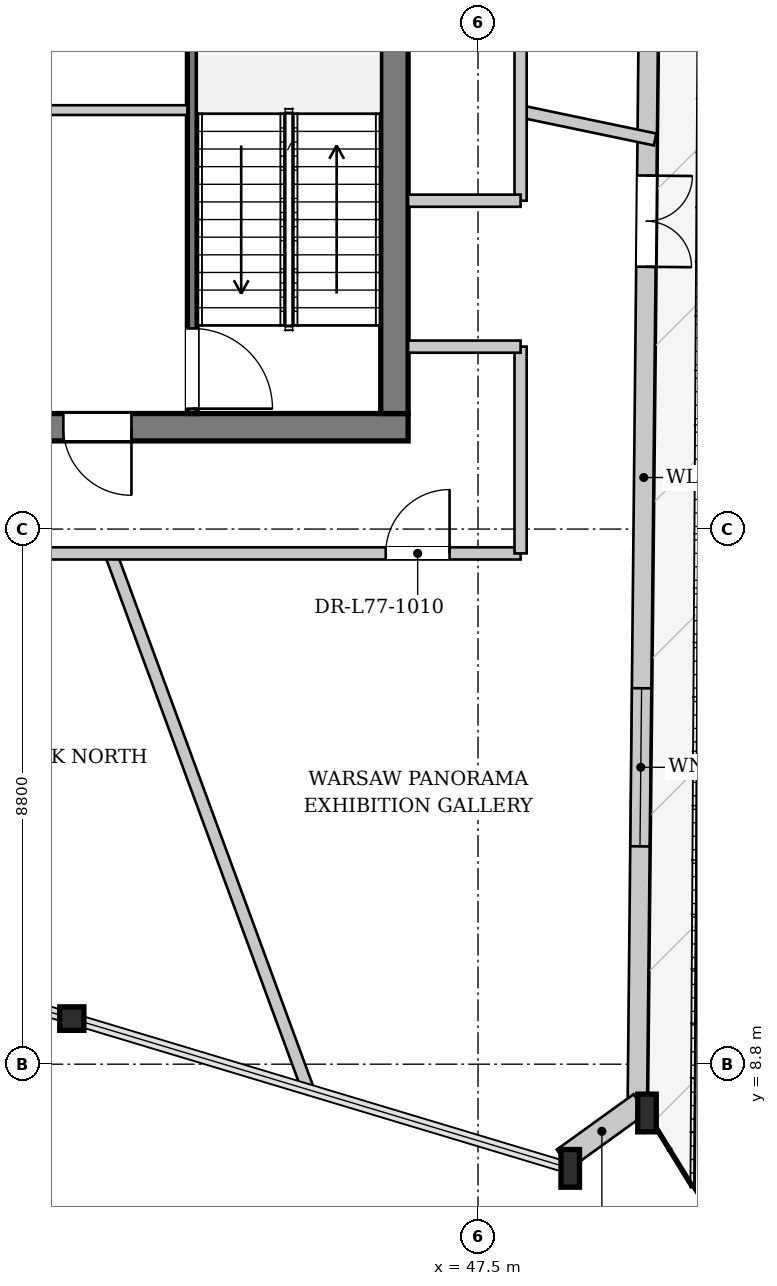
"""IFC4 building model, lengths in metres.
Left out: names, types, materials, properties, quantities, classifications, styles, units other than length and angle.
Written with IfcOpenShell. Run it as: python <this file> out.ifc"""

import sys

from ifc_helpers import new_model, si_unit, direction, frame, frame_2d, origin, origin_2d, place, context, subcontext, project, spatial, rectangle, i_section, extrude, source, transform, mapped, element, fill, save


model = new_model("IFC4")
c1 = context("Model", 3, precision=1e-05, world=origin(), true_north=direction((0.0, 1.0)))
c2 = subcontext(c1, "Body", "Model", "MODEL_VIEW")
j1 = project(units=[si_unit("LENGTHUNIT", "METRE"), si_unit("PLANEANGLEUNIT", "RADIAN")], contexts=[c1])
p1 = place(None, origin())
s1 = spatial("IfcSite", under=j1, at=p1, CompositionType="ELEMENT")
p2 = place(p1, origin())
s2 = spatial("IfcBuilding", under=s1, at=p2, CompositionType="ELEMENT")
p3 = place(p2, frame((0.0, 0.0, 290.5)))
s3 = spatial("IfcBuildingStorey", under=s2, at=p3, CompositionType="ELEMENT", Elevation=290.5)
m1 = source(origin(), c2, "Body", "SweptSolid", [
    extrude(i_section(OverallWidth=0.398, OverallDepth=0.387, WebThickness=0.019, FlangeThickness=0.029, at=origin_2d()), origin(), (0.0, 0.0, 1.0), 4.255),
])
p4 = place(p3, frame((40.819, 9.55, 0.0), z_axis=(0.0, 0.0, 1.0), x_axis=(1.0, 0.0, 0.0)))
e1 = element("IfcColumn", 1, at=p4, inside=s3, PredefinedType="COLUMN", context=c2, shape_type="MappedRepresentation", body=[
    mapped(m1, transform((0.0, 0.0, 0.0), x_axis=(1.0, 0.0, 0.0), y_axis=(0.0, 1.0, 0.0), z_axis=(0.0, 0.0, 1.0), scale=1.0)),
])
m2 = source(origin(), c2, "Body", "SweptSolid", [
    extrude(i_section(OverallWidth=0.305, OverallDepth=0.62, WebThickness=0.021, FlangeThickness=0.04, at=origin_2d()), origin(), (0.0, 0.0, 1.0), 4.255),
])
for number, where, z_axis, x_axis in (
    (2, (49.017, 7.087, 0.0), (0.0, 0.0, 1.0), (1.0, 0.0, 0.0)),
    (3, (50.279, 7.997, 0.0), (0.0, 0.0, 1.0), (1.0, 0.0, 0.0)),
):
    element("IfcColumn", number, at=place(p3, frame(where, z_axis=z_axis, x_axis=x_axis)), inside=s3, PredefinedType="COLUMN", context=c2, shape_type="MappedRepresentation", body=[
        mapped(m2, transform((0.0, 0.0, 0.0), x_axis=(1.0, 0.0, 0.0), y_axis=(0.0, 1.0, 0.0), z_axis=(0.0, 0.0, 1.0), scale=1.0)),
    ])
p5 = place(p3, frame((50.342, 29.858, 0.0), z_axis=(0.0, 0.0, 1.0), x_axis=(-0.010207538584, -0.999947901721, 0.0)))
e4 = element("IfcWall", 4, at=p5, inside=s3, PredefinedType="SOLIDWALL", context=c2, shape_type="SweptSolid", body=[
    extrude(rectangle(XDim=21.861, YDim=0.32, at=frame_2d((10.93, 0.0))), origin(), (0.0, 0.0, 1.0), 3.782),
])
p6 = place(p5, frame((6.445, 0.0, 0.0)))
e5 = element("IfcOpeningElement", 5, at=p6, cuts=e4, PredefinedType="OPENING", context=c2, shape_type="SweptSolid", body=[
    extrude(rectangle(XDim=1.5, YDim=2.3, at=frame_2d((0.75, 1.15))), frame((0.0, 0.17, 0.0), z_axis=(0.0, -1.0, 0.0), x_axis=(1.0, 0.0, 0.0)), (0.0, 0.0, 1.0), 0.34),
])
p7 = place(p5, frame((14.877, 0.0, 0.65)))
e6 = element("IfcOpeningElement", 6, at=p7, cuts=e4, PredefinedType="OPENING", context=c2, shape_type="SweptSolid", body=[
    extrude(rectangle(XDim=2.6, YDim=2.35, at=frame_2d((1.3, 1.175))), frame((0.0, 0.17, 0.0), z_axis=(0.0, -1.0, 0.0), x_axis=(1.0, 0.0, 0.0)), (0.0, 0.0, 1.0), 0.34),
])
p8 = place(p3, frame((50.168, 8.151, 0.0), z_axis=(0.0, 0.0, 1.0), x_axis=(-0.811063846967, -0.584957636195, 0.0)))
e7 = element("IfcWall", 7, at=p8, inside=s3, PredefinedType="SOLIDWALL", context=c2, shape_type="SweptSolid", body=[
    extrude(rectangle(XDim=1.556, YDim=0.38, at=frame_2d((0.778, 0.0))), origin(), (0.0, 0.0, 1.0), 3.782),
])
p9 = place(p3, frame((46.35, 19.275, 0.0), z_axis=(0.0, 0.0, 1.0), x_axis=(-1.0, 0.0, 0.0)))
e8 = element("IfcWall", 8, at=p9, inside=s3, PredefinedType="SHEAR", context=c2, shape_type="SweptSolid", body=[
    extrude(rectangle(XDim=16.7, YDim=0.45, at=frame_2d((8.35, 0.0))), origin(), (0.0, 0.0, 1.0), 4.24),
])
p10 = place(p9, frame((4.55, 0.0, 0.0)))
e9 = element("IfcOpeningElement", 9, at=p10, cuts=e8, PredefinedType="OPENING", context=c2, shape_type="SweptSolid", body=[
    extrude(rectangle(XDim=1.12, YDim=2.25, at=frame_2d((0.56, 1.125))), frame((0.0, 0.235, 0.0), z_axis=(0.0, -1.0, 0.0), x_axis=(1.0, 0.0, 0.0)), (0.0, 0.0, 1.0), 0.47),
])
p11 = place(p9, frame((11.05, 0.0, 0.0)))
e10 = element("IfcOpeningElement", 10, at=p11, cuts=e8, PredefinedType="OPENING", context=c2, shape_type="SweptSolid", body=[
    extrude(rectangle(XDim=1.12, YDim=2.25, at=frame_2d((0.56, 1.125))), frame((0.0, 0.235, 0.0), z_axis=(0.0, -1.0, 0.0), x_axis=(1.0, 0.0, 0.0)), (0.0, 0.0, 1.0), 0.47),
])
p12 = place(p3, frame((46.125, 33.7, 0.0), z_axis=(0.0, 0.0, 1.0), x_axis=(0.0, -1.0, 0.0)))
e11 = element("IfcWall", 11, at=p12, inside=s3, PredefinedType="SHEAR", context=c2, shape_type="SweptSolid", body=[
    extrude(rectangle(XDim=14.2, YDim=0.45, at=frame_2d((7.1, 0.0))), origin(), (0.0, 0.0, 1.0), 4.24),
])
p13 = place(p12, frame((5.18, 0.0, 0.0)))
e12 = element("IfcOpeningElement", 12, at=p13, cuts=e11, PredefinedType="OPENING", context=c2, shape_type="SweptSolid", body=[
    extrude(rectangle(XDim=1.6, YDim=2.2, at=frame_2d((0.8, 1.1))), frame((0.0, 0.235, 0.0), z_axis=(0.0, -1.0, 0.0), x_axis=(1.0, 0.0, 0.0)), (0.0, 0.0, 1.0), 0.47),
])
p14 = place(p12, frame((2.05, 0.0, 0.0)))
e13 = element("IfcOpeningElement", 13, at=p14, cuts=e11, PredefinedType="OPENING", context=c2, shape_type="SweptSolid", body=[
    extrude(rectangle(XDim=0.95, YDim=2.1, at=frame_2d((0.475, 1.05))), frame((0.0, 0.235, 0.0), z_axis=(0.0, -1.0, 0.0), x_axis=(1.0, 0.0, 0.0)), (0.0, 0.0, 1.0), 0.47),
])
p15 = place(p3, frame((42.8, 26.96, 0.0), z_axis=(0.0, 0.0, 1.0), x_axis=(0.0, -1.0, 0.0)))
e14 = element("IfcWall", 14, at=p15, inside=s3, PredefinedType="PARTITIONING", context=c2, shape_type="SweptSolid", body=[
    extrude(rectangle(XDim=7.46, YDim=0.16, at=frame_2d((3.73, 0.0))), origin(), (0.0, 0.0, 1.0), 4.24),
])
p16 = place(p15, frame((6.06, 0.0, 0.0)))
e15 = element("IfcOpeningElement", 15, at=p16, cuts=e14, PredefinedType="OPENING", context=c2, shape_type="SweptSolid", body=[
    extrude(rectangle(XDim=1.32, YDim=2.2, at=frame_2d((0.66, 1.1))), frame((0.0, 0.09, 0.0), z_axis=(0.0, -1.0, 0.0), x_axis=(1.0, 0.0, 0.0)), (0.0, 0.0, 1.0), 0.18),
])
p17 = place(p3, frame((33.28, 24.49, 0.0), z_axis=(0.0, 0.0, 1.0), x_axis=(1.0, 0.0, 0.0)))
e16 = element("IfcWall", 16, at=p17, inside=s3, PredefinedType="PARTITIONING", context=c2, shape_type="SweptSolid", body=[
    extrude(rectangle(XDim=9.44, YDim=0.16, at=frame_2d((4.72, 0.0))), origin(), (0.0, 0.0, 1.0), 4.24),
])
p18 = place(p17, frame((0.85, 0.0, 0.95)))
e17 = element("IfcOpeningElement", 17, at=p18, cuts=e16, PredefinedType="OPENING", context=c2, shape_type="SweptSolid", body=[
    extrude(rectangle(XDim=1.4, YDim=1.8, at=frame_2d((0.7, 0.9))), frame((0.0, 0.09, 0.0), z_axis=(0.0, -1.0, 0.0), x_axis=(1.0, 0.0, 0.0)), (0.0, 0.0, 1.0), 0.18),
])
p19 = place(p3, frame((41.458, 17.2, 0.0), z_axis=(0.0, 0.0, 1.0), x_axis=(0.345312374887, -0.938487806927, 0.0)))
e18 = element("IfcWall", 18, at=p19, inside=s3, PredefinedType="PARTITIONING", context=c2, shape_type="SweptSolid", body=[
    extrude(rectangle(XDim=9.357, YDim=0.2, at=frame_2d((4.679, 0.0))), origin(), (0.0, 0.0, 1.0), 4.24),
])
p20 = place(p3, frame((48.2, 24.469, 0.0), z_axis=(0.0, 0.0, 1.0), x_axis=(0.978870641426, -0.204480481596, 0.0)))
e19 = element("IfcWall", 19, at=p20, inside=s3, PredefinedType="PARTITIONING", context=c2, shape_type="SweptSolid", body=[
    extrude(rectangle(XDim=2.26, YDim=0.2, at=frame_2d((1.13, 0.0))), origin(), (0.0, 0.0, 1.0), 4.24),
])
p21 = place(p3, frame((27.8, 17.2, 0.0), z_axis=(0.0, 0.0, 1.0), x_axis=(1.0, 0.0, 0.0)))
e20 = element("IfcWall", 20, at=p21, inside=s3, PredefinedType="PARTITIONING", context=c2, shape_type="SweptSolid", body=[
    extrude(rectangle(XDim=20.4, YDim=0.2, at=frame_2d((10.2, 0.0))), origin(), (0.0, 0.0, 1.0), 3.865),
])
p22 = place(p21, frame((7.835, 0.0, 0.0)))
e21 = element("IfcOpeningElement", 21, at=p22, cuts=e20, PredefinedType="OPENING", context=c2, shape_type="SweptSolid", body=[
    extrude(rectangle(XDim=1.05, YDim=2.2, at=frame_2d((0.525, 1.1))), frame((0.0, 0.11, 0.0), z_axis=(0.0, -1.0, 0.0), x_axis=(1.0, 0.0, 0.0)), (0.0, 0.0, 1.0), 0.22),
])
p23 = place(p21, frame((18.182, 0.0, 0.0)))
e22 = element("IfcOpeningElement", 22, at=p23, cuts=e20, PredefinedType="OPENING", context=c2, shape_type="SweptSolid", body=[
    extrude(rectangle(XDim=1.05, YDim=2.2, at=frame_2d((0.525, 1.1))), frame((0.0, 0.11, 0.0), z_axis=(0.0, -1.0, 0.0), x_axis=(1.0, 0.0, 0.0)), (0.0, 0.0, 1.0), 0.22),
])
p24 = place(p3, frame((48.2, 17.2, 0.0), z_axis=(0.0, 0.0, 1.0), x_axis=(0.0, 1.0, 0.0)))
e23 = element("IfcWall", 23, at=p24, inside=s3, PredefinedType="PARTITIONING", context=c2, shape_type="SweptSolid", body=[
    extrude(rectangle(XDim=3.4, YDim=0.2, at=frame_2d((1.7, 0.0))), origin(), (0.0, 0.0, 1.0), 4.24),
])
p25 = place(p3, frame((46.35, 20.6, 0.0), z_axis=(0.0, 0.0, 1.0), x_axis=(1.0, 0.0, 0.0)))
e24 = element("IfcWall", 24, at=p25, inside=s3, PredefinedType="PARTITIONING", context=c2, shape_type="SweptSolid", body=[
    extrude(rectangle(XDim=1.85, YDim=0.2, at=frame_2d((0.925, 0.0))), origin(), (0.0, 0.0, 1.0), 4.24),
])
p26 = place(p3, frame((48.2, 23.0, 0.0), z_axis=(0.0, 0.0, 1.0), x_axis=(0.0, 1.0, 0.0)))
e25 = element("IfcWall", 25, at=p26, inside=s3, PredefinedType="PARTITIONING", context=c2, shape_type="SweptSolid", body=[
    extrude(rectangle(XDim=13.0, YDim=0.2, at=frame_2d((6.5, 0.0))), origin(), (0.0, 0.0, 1.0), 3.925),
])
p27 = place(p26, frame((9.393, 0.0, 0.0)))
e26 = element("IfcOpeningElement", 26, at=p27, cuts=e25, PredefinedType="OPENING", context=c2, shape_type="SweptSolid", body=[
    extrude(rectangle(XDim=1.05, YDim=2.2, at=frame_2d((0.525, 1.1))), frame((0.0, 0.11, 0.0), z_axis=(0.0, -1.0, 0.0), x_axis=(1.0, 0.0, 0.0)), (0.0, 0.0, 1.0), 0.22),
])
p28 = place(p3, frame((46.35, 23.0, 0.0), z_axis=(0.0, 0.0, 1.0), x_axis=(1.0, 0.0, 0.0)))
e27 = element("IfcWall", 27, at=p28, inside=s3, PredefinedType="PARTITIONING", context=c2, shape_type="SweptSolid", body=[
    extrude(rectangle(XDim=1.85, YDim=0.2, at=frame_2d((0.925, 0.0))), origin(), (0.0, 0.0, 1.0), 4.24),
])
m3 = source(origin(), c2, "Body", "SweptSolid", [
    extrude(rectangle(XDim=1.5, YDim=2.3, at=frame_2d((0.75, 1.15))), frame((0.0, 0.025, 0.0), z_axis=(0.0, -1.0, 0.0), x_axis=(1.0, 0.0, 0.0)), (0.0, 0.0, 1.0), 0.05),
])
p29 = place(p6, origin())
e28 = element("IfcDoor", 28, at=p29, inside=s3, OperationType="DOUBLE_DOOR_SINGLE_SWING", PredefinedType="DOOR", context=c2, shape_type="MappedRepresentation", body=[
    mapped(m3, transform((0.0, 0.0, 0.0), x_axis=(1.0, 0.0, 0.0), y_axis=(0.0, 1.0, 0.0), z_axis=(0.0, 0.0, 1.0), scale=1.0)),
])
fill(e5, e28)
m4 = source(origin(), c2, "Body", "SweptSolid", [
    extrude(rectangle(XDim=2.6, YDim=2.35, at=frame_2d((1.3, 1.175))), frame((0.0, 0.03, 0.0), z_axis=(0.0, -1.0, 0.0), x_axis=(1.0, 0.0, 0.0)), (0.0, 0.0, 1.0), 0.06),
])
p30 = place(p7, origin())
e29 = element("IfcWindow", 29, at=p30, inside=s3, PartitioningType="SINGLE_PANEL", PredefinedType="WINDOW", context=c2, shape_type="MappedRepresentation", body=[
    mapped(m4, transform((0.0, 0.0, 0.0), x_axis=(1.0, 0.0, 0.0), y_axis=(0.0, 1.0, 0.0), z_axis=(0.0, 0.0, 1.0), scale=1.0)),
])
fill(e6, e29)
m5 = source(origin(), c2, "Body", "SweptSolid", [
    extrude(rectangle(XDim=1.12, YDim=2.25, at=frame_2d((0.56, 1.125))), frame((0.0, 0.025, 0.0), z_axis=(0.0, -1.0, 0.0), x_axis=(1.0, 0.0, 0.0)), (0.0, 0.0, 1.0), 0.05),
])
p31 = place(p10, origin())
e30 = element("IfcDoor", 30, at=p31, inside=s3, OperationType="SINGLE_SWING_LEFT", PredefinedType="DOOR", context=c2, shape_type="MappedRepresentation", body=[
    mapped(m5, transform((0.0, 0.0, 0.0), x_axis=(1.0, 0.0, 0.0), y_axis=(0.0, 1.0, 0.0), z_axis=(0.0, 0.0, 1.0), scale=1.0)),
])
fill(e9, e30)
m6 = source(origin(), c2, "Body", "SweptSolid", [
    extrude(rectangle(XDim=1.32, YDim=2.2, at=frame_2d((0.66, 1.1))), frame((0.0, 0.025, 0.0), z_axis=(0.0, -1.0, 0.0), x_axis=(1.0, 0.0, 0.0)), (0.0, 0.0, 1.0), 0.05),
])
p32 = place(p16, origin())
e31 = element("IfcDoor", 31, at=p32, inside=s3, OperationType="SINGLE_SWING_RIGHT", PredefinedType="DOOR", context=c2, shape_type="MappedRepresentation", body=[
    mapped(m6, transform((0.0, 0.0, 0.0), x_axis=(1.0, 0.0, 0.0), y_axis=(0.0, 1.0, 0.0), z_axis=(0.0, 0.0, 1.0), scale=1.0)),
])
fill(e15, e31)
m7 = source(origin(), c2, "Body", "SweptSolid", [
    extrude(rectangle(XDim=1.05, YDim=2.2, at=frame_2d((0.525, 1.1))), frame((0.0, 0.025, 0.0), z_axis=(0.0, -1.0, 0.0), x_axis=(1.0, 0.0, 0.0)), (0.0, 0.0, 1.0), 0.05),
])
p33 = place(p23, origin())
e32 = element("IfcDoor", 32, at=p33, inside=s3, OperationType="SINGLE_SWING_RIGHT", PredefinedType="DOOR", context=c2, shape_type="MappedRepresentation", body=[
    mapped(m7, transform((0.0, 0.0, 0.0), x_axis=(1.0, 0.0, 0.0), y_axis=(0.0, 1.0, 0.0), z_axis=(0.0, 0.0, 1.0), scale=1.0)),
])
fill(e22, e32)
save(model, sys.argv[1])
